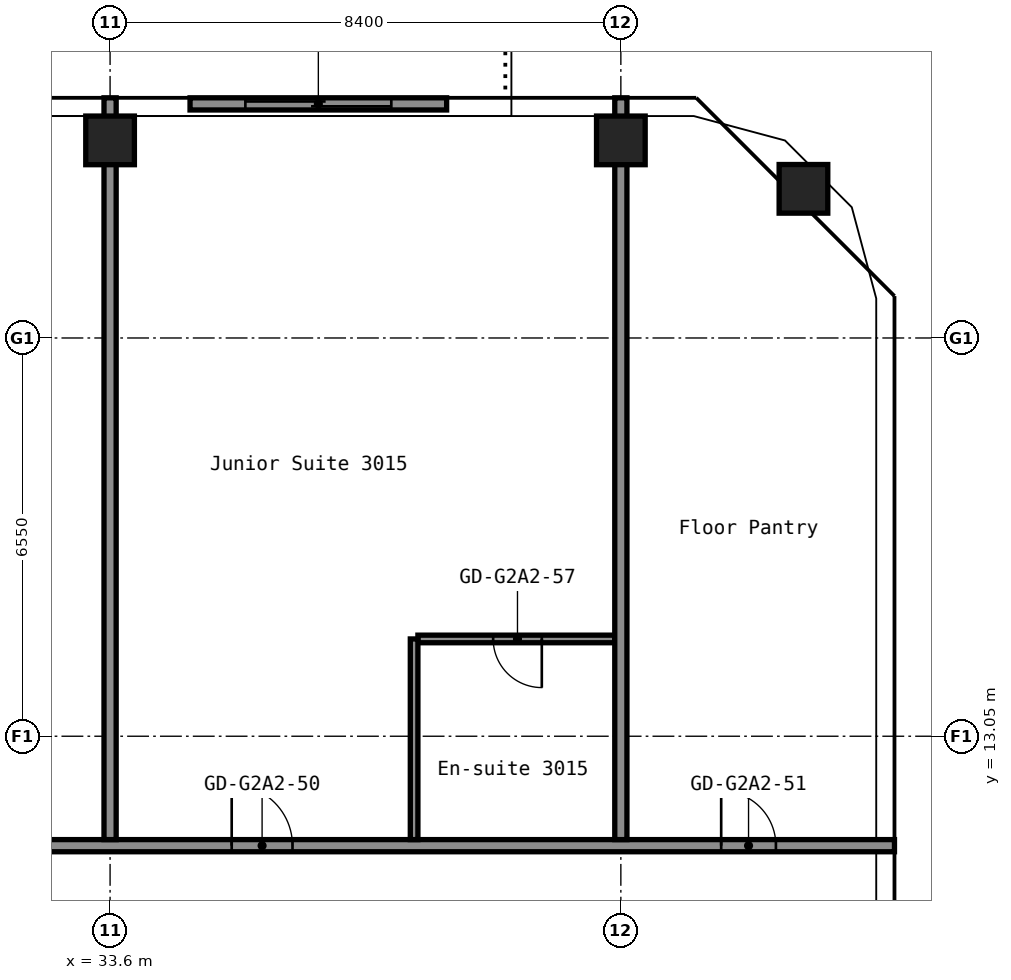
"""IFC4 building model, lengths in metres.
Left out: names, types, materials, properties, quantities, classifications, styles, units other than length and angle.
Written with IfcOpenShell. Run it as: python <this file> out.ifc"""

import sys

from ifc_helpers import new_model, si_unit, direction, frame, frame_2d, origin, origin_2d, place, context, subcontext, project, spatial, rectangle, hollow_rectangle, extrude, element, fill, save


model = new_model("IFC4")
c1 = context("Model", 3, precision=1e-05, world=origin(), true_north=direction((0.0, 1.0)))
c2 = subcontext(c1, "Body", "Model", "MODEL_VIEW")
j1 = project(units=[si_unit("LENGTHUNIT", "METRE"), si_unit("PLANEANGLEUNIT", "RADIAN")], contexts=[c1])
p1 = place(None, origin())
s1 = spatial("IfcSite", under=j1, at=p1, CompositionType="ELEMENT")
p2 = place(p1, origin())
s2 = spatial("IfcBuilding", under=s1, at=p2, CompositionType="ELEMENT")
p3 = place(p2, frame((0.0, 0.0, 107.4)))
s3 = spatial("IfcBuildingStorey", under=s2, at=p3, CompositionType="ELEMENT", Elevation=107.4)
for number, where, z_axis, x_axis in (
    (1, (33.6, 22.85, 0.0), (0.0, 0.0, 1.0), (1.0, 0.0, 0.0)),
    (2, (42.0, 22.85, 0.0), (0.0, 0.0, 1.0), (1.0, 0.0, 0.0)),
    (3, (45.003, 22.053, 0.0), (0.0, 0.0, 1.0), (1.0, 0.0, 0.0)),
):
    element("IfcColumn", number, at=place(p3, frame(where, z_axis=z_axis, x_axis=x_axis)), inside=s3, PredefinedType="COLUMN", context=c2, shape_type="SweptSolid", body=[
        extrude(hollow_rectangle(XDim=0.8, YDim=0.8, WallThickness=0.032, at=origin_2d()), origin(), (0.0, 0.0, 1.0), 2.8),
    ])
p4 = place(p3, frame((16.8, 11.25, 0.0), z_axis=(0.0, 0.0, 1.0), x_axis=(1.0, 0.0, 0.0)))
e4 = element("IfcWall", 4, at=p4, inside=s3, PredefinedType="PARTITIONING", context=c2, shape_type="SweptSolid", body=[
    extrude(rectangle(XDim=29.7, YDim=0.2, at=frame_2d((14.85, 0.0))), origin(), (0.0, 0.0, 1.0), 2.8),
])
p5 = place(p4, frame((2.0, 0.0, 0.0)))
e5 = element("IfcOpeningElement", 5, at=p5, cuts=e4, PredefinedType="OPENING", context=c2, shape_type="SweptSolid", body=[
    extrude(rectangle(XDim=1.0, YDim=2.1, at=frame_2d((0.5, 1.05))), frame((0.0, 0.11, 0.0), z_axis=(0.0, -1.0, 0.0), x_axis=(1.0, 0.0, 0.0)), (0.0, 0.0, 1.0), 0.22),
])
p6 = place(p4, frame((13.8, 0.0, 0.0)))
e6 = element("IfcOpeningElement", 6, at=p6, cuts=e4, PredefinedType="OPENING", context=c2, shape_type="SweptSolid", body=[
    extrude(rectangle(XDim=1.0, YDim=2.1, at=frame_2d((0.5, 1.05))), frame((0.0, 0.11, 0.0), z_axis=(0.0, -1.0, 0.0), x_axis=(1.0, 0.0, 0.0)), (0.0, 0.0, 1.0), 0.22),
])
p7 = place(p4, frame((18.8, 0.0, 0.0)))
e7 = element("IfcOpeningElement", 7, at=p7, cuts=e4, PredefinedType="OPENING", context=c2, shape_type="SweptSolid", body=[
    extrude(rectangle(XDim=1.0, YDim=2.1, at=frame_2d((0.5, 1.05))), frame((0.0, 0.11, 0.0), z_axis=(0.0, -1.0, 0.0), x_axis=(1.0, 0.0, 0.0)), (0.0, 0.0, 1.0), 0.22),
])
p8 = place(p4, frame((26.85, 0.0, 0.0)))
e8 = element("IfcOpeningElement", 8, at=p8, cuts=e4, PredefinedType="OPENING", context=c2, shape_type="SweptSolid", body=[
    extrude(rectangle(XDim=0.9, YDim=2.1, at=frame_2d((0.45, 1.05))), frame((0.0, 0.11, 0.0), z_axis=(0.0, -1.0, 0.0), x_axis=(1.0, 0.0, 0.0)), (0.0, 0.0, 1.0), 0.22),
])
p9 = place(p3, frame((38.663, 14.65, 0.0), z_axis=(0.0, 0.0, 1.0), x_axis=(1.0, 0.0, 0.0)))
e9 = element("IfcWall", 9, at=p9, inside=s3, PredefinedType="PARTITIONING", context=c2, shape_type="SweptSolid", body=[
    extrude(rectangle(XDim=3.237, YDim=0.125, at=frame_2d((1.619, 0.0))), origin(), (0.0, 0.0, 1.0), 2.8),
])
p10 = place(p9, frame((1.238, 0.0, 0.0)))
e10 = element("IfcOpeningElement", 10, at=p10, cuts=e9, PredefinedType="OPENING", context=c2, shape_type="SweptSolid", body=[
    extrude(rectangle(XDim=0.8, YDim=2.1, at=frame_2d((0.4, 1.05))), frame((0.0, 0.073, 0.0), z_axis=(0.0, -1.0, 0.0), x_axis=(1.0, 0.0, 0.0)), (0.0, 0.0, 1.0), 0.145),
])
p11 = place(p3, frame((33.6, 11.35, 0.0), z_axis=(0.0, 0.0, 1.0), x_axis=(0.0, 1.0, 0.0)))
e11 = element("IfcWall", 11, at=p11, inside=s3, PredefinedType="PARTITIONING", context=c2, shape_type="SweptSolid", body=[
    extrude(rectangle(XDim=12.2, YDim=0.2, at=frame_2d((6.1, 0.0))), origin(), (0.0, 0.0, 1.0), 2.8),
])
p12 = place(p3, frame((38.6, 11.35, 0.0), z_axis=(0.0, 0.0, 1.0), x_axis=(0.0, 1.0, 0.0)))
e12 = element("IfcWall", 12, at=p12, inside=s3, PredefinedType="PARTITIONING", context=c2, shape_type="SweptSolid", body=[
    extrude(rectangle(XDim=3.3, YDim=0.125, at=frame_2d((1.65, 0.0))), origin(), (0.0, 0.0, 1.0), 2.8),
])
p13 = place(p3, frame((42.0, 11.35, 0.0), z_axis=(0.0, 0.0, 1.0), x_axis=(0.0, 1.0, 0.0)))
e13 = element("IfcWall", 13, at=p13, inside=s3, PredefinedType="PARTITIONING", context=c2, shape_type="SweptSolid", body=[
    extrude(rectangle(XDim=12.2, YDim=0.2, at=frame_2d((6.1, 0.0))), origin(), (0.0, 0.0, 1.0), 2.8),
])
p14 = place(p3, frame((39.135, 23.45, 0.0), z_axis=(0.0, 0.0, 1.0), x_axis=(-1.0, 0.0, 0.0)))
p15 = place(p14, frame((0.91, 0.0, 0.0)))
p16 = place(p15, frame((2.4, 0.0, 0.0), z_axis=(0.0, 0.0, 1.0), x_axis=(-1.0, 0.0, 0.0)))
e14 = element("IfcDoor", 14, at=p16, inside=s3, OperationType="SLIDING_TO_LEFT", PredefinedType="DOOR", context=c2, shape_type="SweptSolid", body=[
    extrude(rectangle(XDim=2.4, YDim=2.2, at=frame_2d((1.2, 1.1))), frame((0.0, 0.025, 0.0), z_axis=(0.0, -1.0, 0.0), x_axis=(1.0, 0.0, 0.0)), (0.0, 0.0, 1.0), 0.05),
])
p17 = place(p7, origin())
e15 = element("IfcDoor", 15, at=p17, inside=s3, OperationType="SINGLE_SWING_RIGHT", PredefinedType="DOOR", context=c2, shape_type="SweptSolid", body=[
    extrude(rectangle(XDim=1.0, YDim=2.1, at=frame_2d((0.5, 1.05))), frame((0.0, 0.025, 0.0), z_axis=(0.0, -1.0, 0.0), x_axis=(1.0, 0.0, 0.0)), (0.0, 0.0, 1.0), 0.05),
])
fill(e7, e15)
p18 = place(p8, origin())
e16 = element("IfcDoor", 16, at=p18, inside=s3, OperationType="SINGLE_SWING_RIGHT", PredefinedType="DOOR", context=c2, shape_type="SweptSolid", body=[
    extrude(rectangle(XDim=0.9, YDim=2.1, at=frame_2d((0.45, 1.05))), frame((0.0, 0.025, 0.0), z_axis=(0.0, -1.0, 0.0), x_axis=(1.0, 0.0, 0.0)), (0.0, 0.0, 1.0), 0.05),
])
fill(e8, e16)
p19 = place(p10, origin())
e17 = element("IfcDoor", 17, at=p19, inside=s3, OperationType="SINGLE_SWING_RIGHT", PredefinedType="DOOR", context=c2, shape_type="SweptSolid", body=[
    extrude(rectangle(XDim=0.8, YDim=2.1, at=frame_2d((0.4, 1.05))), frame((0.0, 0.025, 0.0), z_axis=(0.0, -1.0, 0.0), x_axis=(1.0, 0.0, 0.0)), (0.0, 0.0, 1.0), 0.05),
])
fill(e10, e17)
save(model, sys.argv[1])
